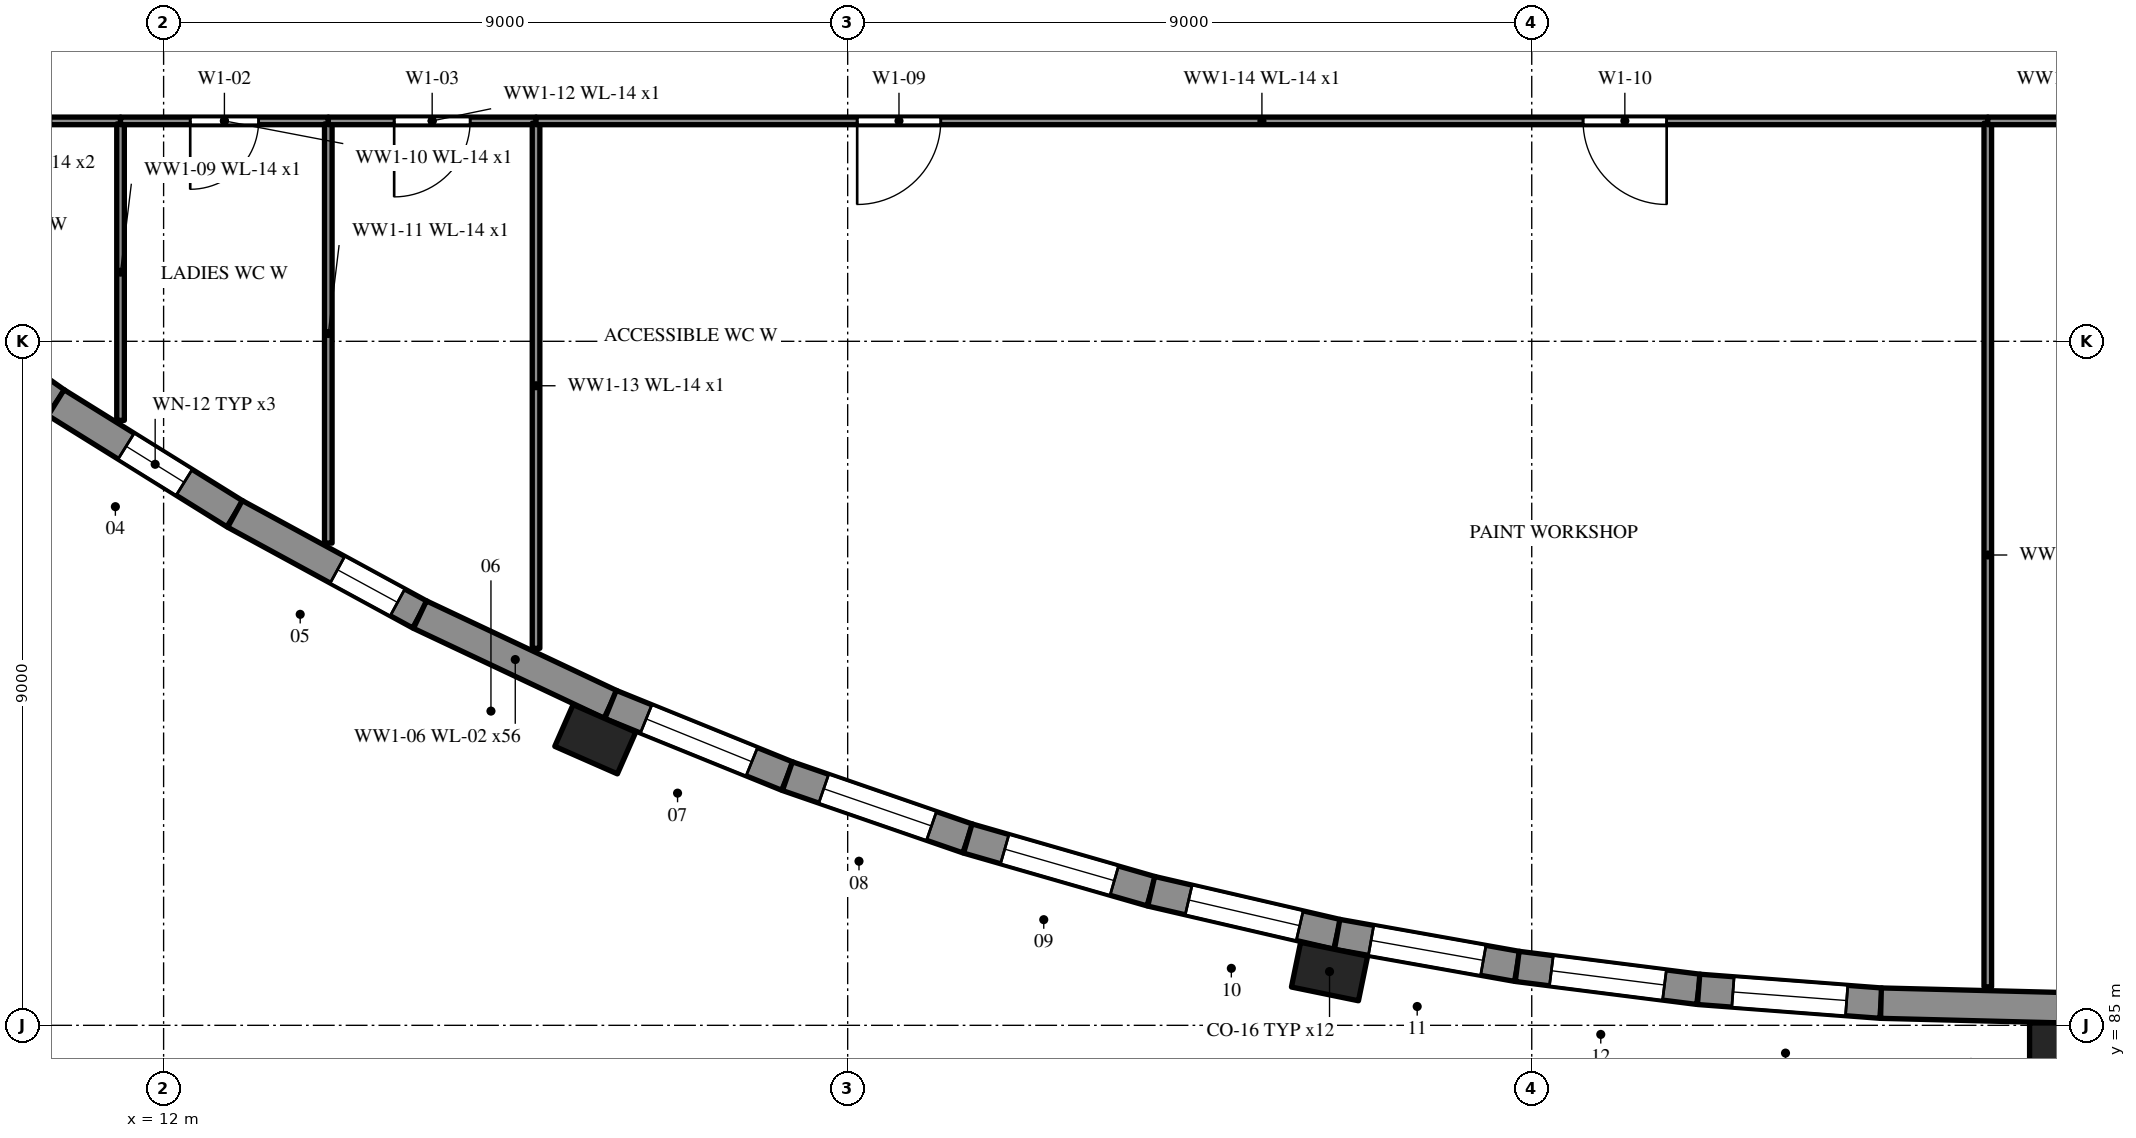
"""IFC4 building model, lengths in metres.
Left out: names, types, materials, properties, quantities, classifications, styles, units other than length and angle.
Written with IfcOpenShell. Run it as: python <this file> out.ifc"""

import sys

from ifc_helpers import new_model, si_unit, direction, frame, frame_2d, origin, origin_2d, place, context, subcontext, project, spatial, rectangle, extrude, element, fill, save


model = new_model("IFC4")
c1 = context("Model", 3, precision=1e-05, world=origin(), true_north=direction((0.0, 1.0)))
c2 = subcontext(c1, "Body", "Model", "MODEL_VIEW")
j1 = project(units=[si_unit("LENGTHUNIT", "METRE"), si_unit("PLANEANGLEUNIT", "RADIAN")], contexts=[c1])
p1 = place(None, origin())
s1 = spatial("IfcSite", under=j1, at=p1, CompositionType="ELEMENT")
p2 = place(p1, origin())
s2 = spatial("IfcBuilding", under=s1, at=p2, CompositionType="ELEMENT")
p3 = place(p2, frame((0.0, 0.0, 5.4)))
s3 = spatial("IfcBuildingStorey", under=s2, at=p3, CompositionType="ELEMENT", Elevation=5.4)
p4 = place(p3, frame((8.32, 94.792, 0.0), z_axis=(0.0, 0.0, 1.0), x_axis=(0.817028877428, -0.576596751161, 0.0)))
e1 = element("IfcWall", 1, at=p4, inside=s3, PredefinedType="SOLIDWALL", context=c2, shape_type="SweptSolid", body=[
    extrude(rectangle(XDim=2.772, YDim=0.4, at=frame_2d((1.386, 0.0))), origin(), (0.0, 0.0, 1.0), 4.8),
])
p5 = place(p4, frame((0.936, 0.0, 1.6)))
e2 = element("IfcOpeningElement", 2, at=p5, cuts=e1, PredefinedType="OPENING", context=c2, shape_type="SweptSolid", body=[
    extrude(rectangle(XDim=0.9, YDim=0.6, at=frame_2d((0.45, 0.3))), frame((0.0, 0.21, 0.0), z_axis=(0.0, -1.0, 0.0), x_axis=(1.0, 0.0, 0.0)), (0.0, 0.0, 1.0), 0.42),
])
p6 = place(p3, frame((10.585, 93.193, 0.0), z_axis=(0.0, 0.0, 1.0), x_axis=(0.84912946359, -0.528184772653, 0.0)))
e3 = element("IfcWall", 3, at=p6, inside=s3, PredefinedType="SOLIDWALL", context=c2, shape_type="SweptSolid", body=[
    extrude(rectangle(XDim=2.772, YDim=0.4, at=frame_2d((1.386, 0.0))), origin(), (0.0, 0.0, 1.0), 4.8),
])
p7 = place(p6, frame((1.086, 0.0, 1.6)))
e4 = element("IfcOpeningElement", 4, at=p7, cuts=e3, PredefinedType="OPENING", context=c2, shape_type="SweptSolid", body=[
    extrude(rectangle(XDim=0.9, YDim=0.6, at=frame_2d((0.45, 0.3))), frame((0.0, 0.21, 0.0), z_axis=(0.0, -1.0, 0.0), x_axis=(1.0, 0.0, 0.0)), (0.0, 0.0, 1.0), 0.42),
])
p8 = place(p3, frame((12.938, 91.729, 0.0), z_axis=(0.0, 0.0, 1.0), x_axis=(0.878292493566, -0.478123724308, 0.0)))
e5 = element("IfcWall", 5, at=p8, inside=s3, PredefinedType="SOLIDWALL", context=c2, shape_type="SweptSolid", body=[
    extrude(rectangle(XDim=2.772, YDim=0.4, at=frame_2d((1.386, 0.0))), origin(), (0.0, 0.0, 1.0), 4.8),
])
p9 = place(p8, frame((1.536, 0.0, 1.6)))
e6 = element("IfcOpeningElement", 6, at=p9, cuts=e5, PredefinedType="OPENING", context=c2, shape_type="SweptSolid", body=[
    extrude(rectangle(XDim=0.9, YDim=0.6, at=frame_2d((0.45, 0.3))), frame((0.0, 0.21, 0.0), z_axis=(0.0, -1.0, 0.0), x_axis=(1.0, 0.0, 0.0)), (0.0, 0.0, 1.0), 0.42),
])
p10 = place(p3, frame((15.373, 90.404, 0.0), z_axis=(0.0, 0.0, 1.0), x_axis=(0.904527098751, -0.42641614372, 0.0)))
e7 = element("IfcWall", 7, at=p10, inside=s3, PredefinedType="SOLIDWALL", context=c2, shape_type="SweptSolid", body=[
    extrude(rectangle(XDim=2.772, YDim=0.4, at=frame_2d((1.386, 0.0))), origin(), (0.0, 0.0, 1.0), 4.8),
])
p11 = place(p3, frame((17.88, 89.222, 0.0), z_axis=(0.0, 0.0, 1.0), x_axis=(0.926722795862, -0.375745738007, 0.0)))
e8 = element("IfcWall", 8, at=p11, inside=s3, PredefinedType="SOLIDWALL", context=c2, shape_type="SweptSolid", body=[
    extrude(rectangle(XDim=2.511, YDim=0.4, at=frame_2d((1.255, 0.0))), origin(), (0.0, 0.0, 1.0), 4.8),
])
p12 = place(p11, frame((0.505, 0.0, 0.9)))
e9 = element("IfcOpeningElement", 9, at=p12, cuts=e8, PredefinedType="OPENING", context=c2, shape_type="SweptSolid", body=[
    extrude(rectangle(XDim=1.5, YDim=2.1, at=frame_2d((0.75, 1.05))), frame((0.0, 0.21, 0.0), z_axis=(0.0, -1.0, 0.0), x_axis=(1.0, 0.0, 0.0)), (0.0, 0.0, 1.0), 0.42),
])
p13 = place(p3, frame((20.207, 88.278, 0.0), z_axis=(0.0, 0.0, 1.0), x_axis=(0.94514546406, -0.326649738659, 0.0)))
e10 = element("IfcWall", 10, at=p13, inside=s3, PredefinedType="SOLIDWALL", context=c2, shape_type="SweptSolid", body=[
    extrude(rectangle(XDim=2.511, YDim=0.4, at=frame_2d((1.256, 0.0))), origin(), (0.0, 0.0, 1.0), 4.8),
])
p14 = place(p13, frame((0.506, 0.0, 0.9)))
e11 = element("IfcOpeningElement", 11, at=p14, cuts=e10, PredefinedType="OPENING", context=c2, shape_type="SweptSolid", body=[
    extrude(rectangle(XDim=1.5, YDim=2.1, at=frame_2d((0.75, 1.05))), frame((0.0, 0.21, 0.0), z_axis=(0.0, -1.0, 0.0), x_axis=(1.0, 0.0, 0.0)), (0.0, 0.0, 1.0), 0.42),
])
p15 = place(p3, frame((22.581, 87.458, 0.0), z_axis=(0.0, 0.0, 1.0), x_axis=(0.961008605775, -0.276518461637, 0.0)))
e12 = element("IfcWall", 12, at=p15, inside=s3, PredefinedType="SOLIDWALL", context=c2, shape_type="SweptSolid", body=[
    extrude(rectangle(XDim=2.511, YDim=0.4, at=frame_2d((1.255, 0.0))), origin(), (0.0, 0.0, 1.0), 4.8),
])
p16 = place(p15, frame((0.506, 0.0, 0.9)))
e13 = element("IfcOpeningElement", 13, at=p16, cuts=e12, PredefinedType="OPENING", context=c2, shape_type="SweptSolid", body=[
    extrude(rectangle(XDim=1.5, YDim=2.1, at=frame_2d((0.75, 1.05))), frame((0.0, 0.21, 0.0), z_axis=(0.0, -1.0, 0.0), x_axis=(1.0, 0.0, 0.0)), (0.0, 0.0, 1.0), 0.42),
])
p17 = place(p3, frame((24.994, 86.764, 0.0), z_axis=(0.0, 0.0, 1.0), x_axis=(0.974210649093, -0.225640446716, 0.0)))
e14 = element("IfcWall", 14, at=p17, inside=s3, PredefinedType="SOLIDWALL", context=c2, shape_type="SweptSolid", body=[
    extrude(rectangle(XDim=2.511, YDim=0.4, at=frame_2d((1.256, 0.0))), origin(), (0.0, 0.0, 1.0), 4.8),
])
p18 = place(p17, frame((0.506, 0.0, 0.9)))
e15 = element("IfcOpeningElement", 15, at=p18, cuts=e14, PredefinedType="OPENING", context=c2, shape_type="SweptSolid", body=[
    extrude(rectangle(XDim=1.5, YDim=2.1, at=frame_2d((0.75, 1.05))), frame((0.0, 0.21, 0.0), z_axis=(0.0, -1.0, 0.0), x_axis=(1.0, 0.0, 0.0)), (0.0, 0.0, 1.0), 0.42),
])
p19 = place(p3, frame((27.44, 86.197, 0.0), z_axis=(0.0, 0.0, 1.0), x_axis=(0.984524011381, -0.175249738987, 0.0)))
e16 = element("IfcWall", 16, at=p19, inside=s3, PredefinedType="SOLIDWALL", context=c2, shape_type="SweptSolid", body=[
    extrude(rectangle(XDim=2.406, YDim=0.4, at=frame_2d((1.203, 0.0))), origin(), (0.0, 0.0, 1.0), 4.8),
])
p20 = place(p19, frame((0.453, 0.0, 0.9)))
e17 = element("IfcOpeningElement", 17, at=p20, cuts=e16, PredefinedType="OPENING", context=c2, shape_type="SweptSolid", body=[
    extrude(rectangle(XDim=1.5, YDim=2.1, at=frame_2d((0.75, 1.05))), frame((0.0, 0.21, 0.0), z_axis=(0.0, -1.0, 0.0), x_axis=(1.0, 0.0, 0.0)), (0.0, 0.0, 1.0), 0.42),
])
p21 = place(p3, frame((29.809, 85.775, 0.0), z_axis=(0.0, 0.0, 1.0), x_axis=(0.99208939311, -0.125533406227, 0.0)))
e18 = element("IfcWall", 18, at=p21, inside=s3, PredefinedType="SOLIDWALL", context=c2, shape_type="SweptSolid", body=[
    extrude(rectangle(XDim=2.406, YDim=0.4, at=frame_2d((1.203, 0.0))), origin(), (0.0, 0.0, 1.0), 4.8),
])
p22 = place(p21, frame((0.453, 0.0, 0.9)))
e19 = element("IfcOpeningElement", 19, at=p22, cuts=e18, PredefinedType="OPENING", context=c2, shape_type="SweptSolid", body=[
    extrude(rectangle(XDim=1.5, YDim=2.1, at=frame_2d((0.75, 1.05))), frame((0.0, 0.21, 0.0), z_axis=(0.0, -1.0, 0.0), x_axis=(1.0, 0.0, 0.0)), (0.0, 0.0, 1.0), 0.42),
])
p23 = place(p3, frame((32.196, 85.473, 0.0), z_axis=(0.0, 0.0, 1.0), x_axis=(0.997146276918, -0.075493724435, 0.0)))
e20 = element("IfcWall", 20, at=p23, inside=s3, PredefinedType="SOLIDWALL", context=c2, shape_type="SweptSolid", body=[
    extrude(rectangle(XDim=2.406, YDim=0.4, at=frame_2d((1.203, 0.0))), origin(), (0.0, 0.0, 1.0), 4.8),
])
p24 = place(p23, frame((0.453, 0.0, 0.9)))
e21 = element("IfcOpeningElement", 21, at=p24, cuts=e20, PredefinedType="OPENING", context=c2, shape_type="SweptSolid", body=[
    extrude(rectangle(XDim=1.5, YDim=2.1, at=frame_2d((0.75, 1.05))), frame((0.0, 0.21, 0.0), z_axis=(0.0, -1.0, 0.0), x_axis=(1.0, 0.0, 0.0)), (0.0, 0.0, 1.0), 0.42),
])
p25 = place(p3, frame((34.595, 85.292, 0.0), z_axis=(0.0, 0.0, 1.0), x_axis=(0.999683321759, -0.025164582196, 0.0)))
e22 = element("IfcWall", 22, at=p25, inside=s3, PredefinedType="SOLIDWALL", context=c2, shape_type="SweptSolid", body=[
    extrude(rectangle(XDim=2.406, YDim=0.4, at=frame_2d((1.203, 0.0))), origin(), (0.0, 0.0, 1.0), 4.8),
])
for number, where, z_axis, x_axis in (
    (23, (17.679, 88.764, 0.0), (0.0, 0.0, 1.0), (0.915, -0.403, 0.0)),
    (24, (27.34, 85.707, 0.0), (0.0, 0.0, 1.0), (0.98, -0.201, 0.0)),
    (25, (37.0, 84.731, 0.0), (0.0, 0.0, 1.0), (1.0, 0.0, 0.0)),
):
    element("IfcColumn", number, at=place(p3, frame(where, z_axis=z_axis, x_axis=x_axis)), inside=s3, PredefinedType="PILASTER", context=c2, shape_type="SweptSolid", body=[
        extrude(rectangle(XDim=0.9, YDim=0.6, at=origin_2d()), origin(), (0.0, 0.0, 1.0), 4.8),
    ])
p26 = place(p3, frame((11.433, 96.9, 0.0), z_axis=(0.0, 0.0, 1.0), x_axis=(-1.0, 0.0, 0.0)))
e26 = element("IfcWall", 26, at=p26, inside=s3, PredefinedType="PARTITIONING", context=c2, shape_type="SweptSolid", body=[
    extrude(rectangle(XDim=2.733, YDim=0.1, at=frame_2d((1.367, 0.0))), origin(), (0.0, 0.0, 1.0), 4.52),
])
p27 = place(p26, frame((0.917, 0.0, 0.0)))
e27 = element("IfcOpeningElement", 27, at=p27, cuts=e26, PredefinedType="OPENING", context=c2, shape_type="SweptSolid", body=[
    extrude(rectangle(XDim=0.9, YDim=2.1, at=frame_2d((0.45, 1.05))), frame((0.0, 0.06, 0.0), z_axis=(0.0, -1.0, 0.0), x_axis=(1.0, 0.0, 0.0)), (0.0, 0.0, 1.0), 0.12),
])
p28 = place(p3, frame((11.433, 96.86, 0.0), z_axis=(0.0, 0.0, 1.0), x_axis=(0.0, -1.0, 0.0)))
e28 = element("IfcWall", 28, at=p28, inside=s3, PredefinedType="PARTITIONING", context=c2, shape_type="SweptSolid", body=[
    extrude(rectangle(XDim=3.9, YDim=0.1, at=frame_2d((1.95, 0.0))), origin(), (0.0, 0.0, 1.0), 4.52),
])
p29 = place(p3, frame((14.167, 96.9, 0.0), z_axis=(0.0, 0.0, 1.0), x_axis=(-1.0, 0.0, 0.0)))
e29 = element("IfcWall", 29, at=p29, inside=s3, PredefinedType="PARTITIONING", context=c2, shape_type="SweptSolid", body=[
    extrude(rectangle(XDim=2.733, YDim=0.1, at=frame_2d((1.367, 0.0))), origin(), (0.0, 0.0, 1.0), 4.52),
])
p30 = place(p29, frame((0.917, 0.0, 0.0)))
e30 = element("IfcOpeningElement", 30, at=p30, cuts=e29, PredefinedType="OPENING", context=c2, shape_type="SweptSolid", body=[
    extrude(rectangle(XDim=0.9, YDim=2.1, at=frame_2d((0.45, 1.05))), frame((0.0, 0.06, 0.0), z_axis=(0.0, -1.0, 0.0), x_axis=(1.0, 0.0, 0.0)), (0.0, 0.0, 1.0), 0.12),
])
p31 = place(p3, frame((14.167, 96.86, 0.0), z_axis=(0.0, 0.0, 1.0), x_axis=(0.0, -1.0, 0.0)))
e31 = element("IfcWall", 31, at=p31, inside=s3, PredefinedType="PARTITIONING", context=c2, shape_type="SweptSolid", body=[
    extrude(rectangle(XDim=5.515, YDim=0.1, at=frame_2d((2.758, 0.0))), origin(), (0.0, 0.0, 1.0), 4.52),
])
p32 = place(p3, frame((16.9, 96.9, 0.0), z_axis=(0.0, 0.0, 1.0), x_axis=(-1.0, 0.0, 0.0)))
e32 = element("IfcWall", 32, at=p32, inside=s3, PredefinedType="PARTITIONING", context=c2, shape_type="SweptSolid", body=[
    extrude(rectangle(XDim=2.733, YDim=0.1, at=frame_2d((1.367, 0.0))), origin(), (0.0, 0.0, 1.0), 4.52),
])
p33 = place(p32, frame((0.867, 0.0, 0.0)))
e33 = element("IfcOpeningElement", 33, at=p33, cuts=e32, PredefinedType="OPENING", context=c2, shape_type="SweptSolid", body=[
    extrude(rectangle(XDim=1.0, YDim=2.1, at=frame_2d((0.5, 1.05))), frame((0.0, 0.06, 0.0), z_axis=(0.0, -1.0, 0.0), x_axis=(1.0, 0.0, 0.0)), (0.0, 0.0, 1.0), 0.12),
])
p34 = place(p3, frame((16.9, 96.87, 0.0), z_axis=(0.0, 0.0, 1.0), x_axis=(0.0, -1.0, 0.0)))
e34 = element("IfcWall", 34, at=p34, inside=s3, PredefinedType="PARTITIONING", context=c2, shape_type="SweptSolid", body=[
    extrude(rectangle(XDim=6.91, YDim=0.1, at=frame_2d((3.455, 0.0))), origin(), (0.0, 0.0, 1.0), 4.52),
])
p35 = place(p3, frame((36.0, 96.9, 0.0), z_axis=(0.0, 0.0, 1.0), x_axis=(-1.0, 0.0, 0.0)))
e35 = element("IfcWall", 35, at=p35, inside=s3, PredefinedType="PARTITIONING", context=c2, shape_type="SweptSolid", body=[
    extrude(rectangle(XDim=19.1, YDim=0.1, at=frame_2d((9.55, 0.0))), origin(), (0.0, 0.0, 1.0), 4.52),
])
p36 = place(p35, frame((13.775, 0.0, 0.0)))
e36 = element("IfcOpeningElement", 36, at=p36, cuts=e35, PredefinedType="OPENING", context=c2, shape_type="SweptSolid", body=[
    extrude(rectangle(XDim=1.1, YDim=2.1, at=frame_2d((0.55, 1.05))), frame((0.0, 0.06, 0.0), z_axis=(0.0, -1.0, 0.0), x_axis=(1.0, 0.0, 0.0)), (0.0, 0.0, 1.0), 0.12),
])
p37 = place(p35, frame((4.225, 0.0, 0.0)))
e37 = element("IfcOpeningElement", 37, at=p37, cuts=e35, PredefinedType="OPENING", context=c2, shape_type="SweptSolid", body=[
    extrude(rectangle(XDim=1.1, YDim=2.1, at=frame_2d((0.55, 1.05))), frame((0.0, 0.06, 0.0), z_axis=(0.0, -1.0, 0.0), x_axis=(1.0, 0.0, 0.0)), (0.0, 0.0, 1.0), 0.12),
])
p38 = place(p3, frame((36.0, 96.87, 0.0), z_axis=(0.0, 0.0, 1.0), x_axis=(0.0, -1.0, 0.0)))
e38 = element("IfcWall", 38, at=p38, inside=s3, PredefinedType="PARTITIONING", context=c2, shape_type="SweptSolid", body=[
    extrude(rectangle(XDim=11.364, YDim=0.1, at=frame_2d((5.682, 0.0))), origin(), (0.0, 0.0, 1.0), 4.52),
])
p39 = place(p3, frame((38.825, 96.9, 0.0), z_axis=(0.0, 0.0, 1.0), x_axis=(-1.0, 0.0, 0.0)))
e39 = element("IfcWall", 39, at=p39, inside=s3, PredefinedType="PARTITIONING", context=c2, shape_type="SweptSolid", body=[
    extrude(rectangle(XDim=2.825, YDim=0.1, at=frame_2d((1.413, 0.0))), origin(), (0.0, 0.0, 1.0), 4.52),
])
p40 = place(p7, origin())
e40 = element("IfcWindow", 40, at=p40, inside=s3, PartitioningType="SINGLE_PANEL", PredefinedType="WINDOW", context=c2, shape_type="SweptSolid", body=[
    extrude(rectangle(XDim=0.9, YDim=0.6, at=frame_2d((0.45, 0.3))), frame((0.0, 0.03, 0.0), z_axis=(0.0, -1.0, 0.0), x_axis=(1.0, 0.0, 0.0)), (0.0, 0.0, 1.0), 0.06),
])
fill(e4, e40)
p41 = place(p9, origin())
e41 = element("IfcWindow", 41, at=p41, inside=s3, PartitioningType="SINGLE_PANEL", PredefinedType="WINDOW", context=c2, shape_type="SweptSolid", body=[
    extrude(rectangle(XDim=0.9, YDim=0.6, at=frame_2d((0.45, 0.3))), frame((0.0, 0.03, 0.0), z_axis=(0.0, -1.0, 0.0), x_axis=(1.0, 0.0, 0.0)), (0.0, 0.0, 1.0), 0.06),
])
fill(e6, e41)
p42 = place(p12, origin())
e42 = element("IfcWindow", 42, at=p42, inside=s3, PartitioningType="SINGLE_PANEL", PredefinedType="WINDOW", context=c2, shape_type="SweptSolid", body=[
    extrude(rectangle(XDim=1.5, YDim=2.1, at=frame_2d((0.75, 1.05))), frame((0.0, 0.03, 0.0), z_axis=(0.0, -1.0, 0.0), x_axis=(1.0, 0.0, 0.0)), (0.0, 0.0, 1.0), 0.06),
])
fill(e9, e42)
p43 = place(p14, origin())
e43 = element("IfcWindow", 43, at=p43, inside=s3, PartitioningType="SINGLE_PANEL", PredefinedType="WINDOW", context=c2, shape_type="SweptSolid", body=[
    extrude(rectangle(XDim=1.5, YDim=2.1, at=frame_2d((0.75, 1.05))), frame((0.0, 0.03, 0.0), z_axis=(0.0, -1.0, 0.0), x_axis=(1.0, 0.0, 0.0)), (0.0, 0.0, 1.0), 0.06),
])
fill(e11, e43)
p44 = place(p16, origin())
e44 = element("IfcWindow", 44, at=p44, inside=s3, PartitioningType="SINGLE_PANEL", PredefinedType="WINDOW", context=c2, shape_type="SweptSolid", body=[
    extrude(rectangle(XDim=1.5, YDim=2.1, at=frame_2d((0.75, 1.05))), frame((0.0, 0.03, 0.0), z_axis=(0.0, -1.0, 0.0), x_axis=(1.0, 0.0, 0.0)), (0.0, 0.0, 1.0), 0.06),
])
fill(e13, e44)
p45 = place(p18, origin())
e45 = element("IfcWindow", 45, at=p45, inside=s3, PartitioningType="SINGLE_PANEL", PredefinedType="WINDOW", context=c2, shape_type="SweptSolid", body=[
    extrude(rectangle(XDim=1.5, YDim=2.1, at=frame_2d((0.75, 1.05))), frame((0.0, 0.03, 0.0), z_axis=(0.0, -1.0, 0.0), x_axis=(1.0, 0.0, 0.0)), (0.0, 0.0, 1.0), 0.06),
])
fill(e15, e45)
p46 = place(p20, origin())
e46 = element("IfcWindow", 46, at=p46, inside=s3, PartitioningType="SINGLE_PANEL", PredefinedType="WINDOW", context=c2, shape_type="SweptSolid", body=[
    extrude(rectangle(XDim=1.5, YDim=2.1, at=frame_2d((0.75, 1.05))), frame((0.0, 0.03, 0.0), z_axis=(0.0, -1.0, 0.0), x_axis=(1.0, 0.0, 0.0)), (0.0, 0.0, 1.0), 0.06),
])
fill(e17, e46)
p47 = place(p22, origin())
e47 = element("IfcWindow", 47, at=p47, inside=s3, PartitioningType="SINGLE_PANEL", PredefinedType="WINDOW", context=c2, shape_type="SweptSolid", body=[
    extrude(rectangle(XDim=1.5, YDim=2.1, at=frame_2d((0.75, 1.05))), frame((0.0, 0.03, 0.0), z_axis=(0.0, -1.0, 0.0), x_axis=(1.0, 0.0, 0.0)), (0.0, 0.0, 1.0), 0.06),
])
fill(e19, e47)
p48 = place(p24, origin())
e48 = element("IfcWindow", 48, at=p48, inside=s3, PartitioningType="SINGLE_PANEL", PredefinedType="WINDOW", context=c2, shape_type="SweptSolid", body=[
    extrude(rectangle(XDim=1.5, YDim=2.1, at=frame_2d((0.75, 1.05))), frame((0.0, 0.03, 0.0), z_axis=(0.0, -1.0, 0.0), x_axis=(1.0, 0.0, 0.0)), (0.0, 0.0, 1.0), 0.06),
])
fill(e21, e48)
p49 = place(p30, origin())
e49 = element("IfcDoor", 49, at=p49, inside=s3, OperationType="SINGLE_SWING_RIGHT", PredefinedType="DOOR", context=c2, shape_type="SweptSolid", body=[
    extrude(rectangle(XDim=0.9, YDim=2.1, at=frame_2d((0.45, 1.05))), frame((0.0, 0.025, 0.0), z_axis=(0.0, -1.0, 0.0), x_axis=(1.0, 0.0, 0.0)), (0.0, 0.0, 1.0), 0.05),
])
fill(e30, e49)
p50 = place(p33, origin())
e50 = element("IfcDoor", 50, at=p50, inside=s3, OperationType="SINGLE_SWING_RIGHT", PredefinedType="DOOR", context=c2, shape_type="SweptSolid", body=[
    extrude(rectangle(XDim=1.0, YDim=2.1, at=frame_2d((0.5, 1.05))), frame((0.0, 0.025, 0.0), z_axis=(0.0, -1.0, 0.0), x_axis=(1.0, 0.0, 0.0)), (0.0, 0.0, 1.0), 0.05),
])
fill(e33, e50)
p51 = place(p36, origin())
e51 = element("IfcDoor", 51, at=p51, inside=s3, OperationType="SINGLE_SWING_RIGHT", PredefinedType="DOOR", context=c2, shape_type="SweptSolid", body=[
    extrude(rectangle(XDim=1.1, YDim=2.1, at=frame_2d((0.55, 1.05))), frame((0.0, 0.025, 0.0), z_axis=(0.0, -1.0, 0.0), x_axis=(1.0, 0.0, 0.0)), (0.0, 0.0, 1.0), 0.05),
])
fill(e36, e51)
p52 = place(p37, origin())
e52 = element("IfcDoor", 52, at=p52, inside=s3, OperationType="SINGLE_SWING_LEFT", PredefinedType="DOOR", context=c2, shape_type="SweptSolid", body=[
    extrude(rectangle(XDim=1.1, YDim=2.1, at=frame_2d((0.55, 1.05))), frame((0.0, 0.025, 0.0), z_axis=(0.0, -1.0, 0.0), x_axis=(1.0, 0.0, 0.0)), (0.0, 0.0, 1.0), 0.05),
])
fill(e37, e52)
save(model, sys.argv[1])
